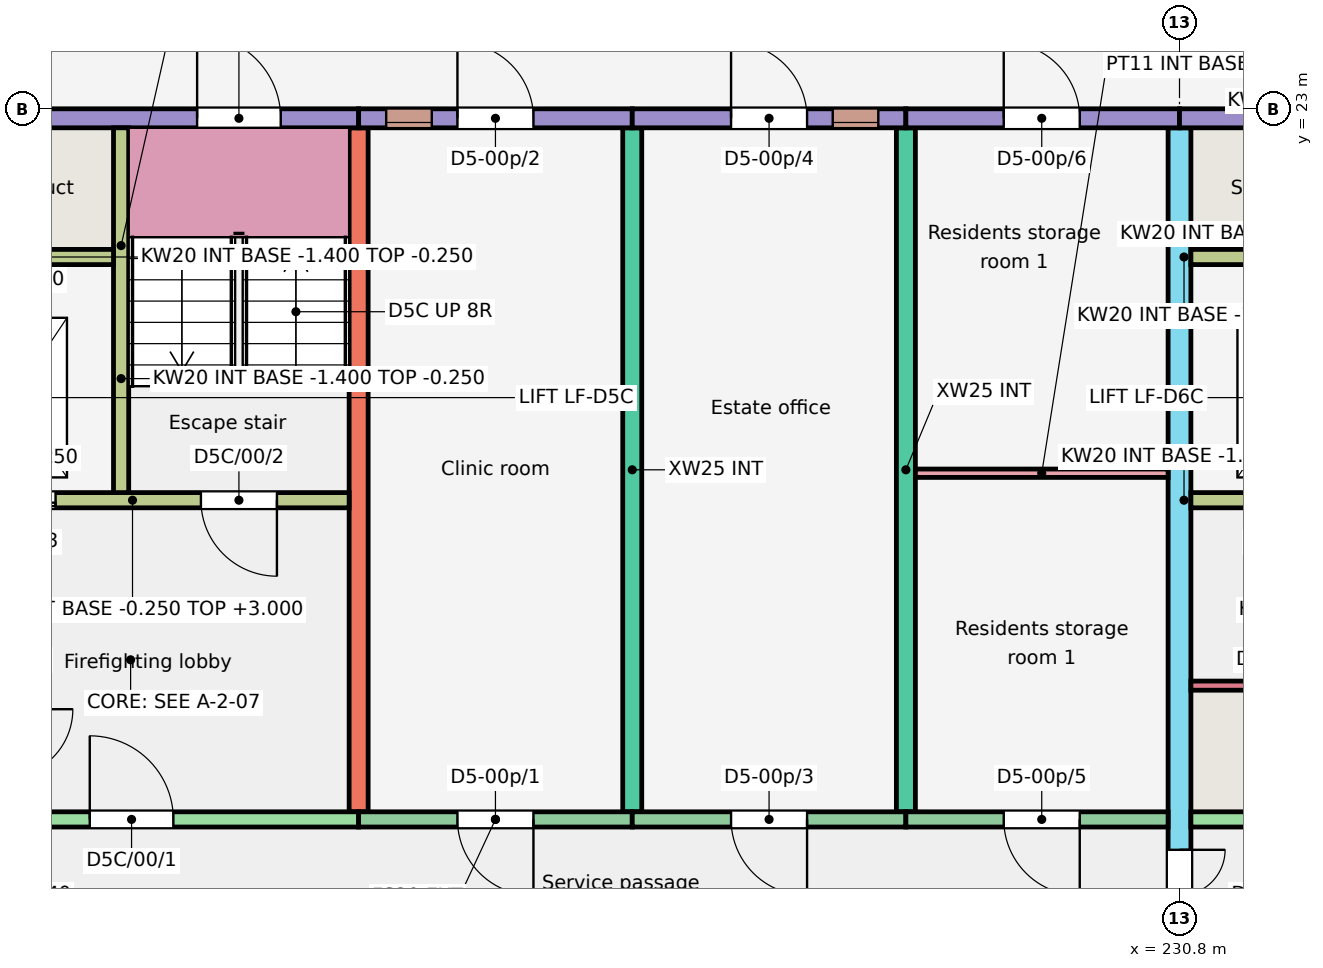
"""IFC4 building model, lengths in metres.
Left out: names, types, materials, properties, quantities, classifications, styles, units other than length and angle.
Written with IfcOpenShell. Run it as: python <this file> out.ifc"""

import sys

from ifc_helpers import new_model, si_unit, direction, frame, frame_2d, origin, place, context, subcontext, project, spatial, rectangle, extrude, element, fill, save


model = new_model("IFC4")
c1 = context("Model", 3, precision=1e-05, world=origin(), true_north=direction((0.0, 1.0)))
c2 = subcontext(c1, "Body", "Model", "MODEL_VIEW")
j1 = project(units=[si_unit("LENGTHUNIT", "METRE"), si_unit("PLANEANGLEUNIT", "RADIAN")], contexts=[c1])
p1 = place(None, origin())
s1 = spatial("IfcSite", under=j1, at=p1, CompositionType="ELEMENT")
p2 = place(p1, origin())
s2 = spatial("IfcBuilding", under=s1, at=p2, CompositionType="ELEMENT")
p3 = place(p2, origin())
s3 = spatial("IfcBuildingStorey", under=s2, at=p3, CompositionType="ELEMENT", Elevation=0.0)
for number, where, z_axis, x_axis in (
    (1, (220.0, 13.75, -0.25), (0.0, 0.0, 1.0), (0.0, 1.0, 0.0)),
    (2, (223.6, 13.75, -0.25), (0.0, 0.0, 1.0), (0.0, 1.0, 0.0)),
    (3, (227.2, 13.75, -0.25), (0.0, 0.0, 1.0), (0.0, 1.0, 0.0)),
):
    element("IfcWall", number, at=place(p3, frame(where, z_axis=z_axis, x_axis=x_axis)), inside=s3, PredefinedType="SHEAR", context=c2, shape_type="SweptSolid", body=[
        extrude(rectangle(XDim=9.0, YDim=0.25, at=frame_2d((4.5, 0.0))), origin(), (0.0, 0.0, 1.0), 3.25),
    ])
p4 = place(p3, frame((230.8, 11.75, -0.25), z_axis=(0.0, 0.0, 1.0), x_axis=(0.0, 1.0, 0.0)))
e4 = element("IfcWall", 4, at=p4, inside=s3, PredefinedType="SHEAR", context=c2, shape_type="SweptSolid", body=[
    extrude(rectangle(XDim=11.0, YDim=0.3, at=frame_2d((5.5, 0.0))), origin(), (0.0, 0.0, 1.0), 3.25),
])
p5 = place(p4, frame((0.3, 0.0, 0.25)))
e5 = element("IfcOpeningElement", 5, at=p5, cuts=e4, PredefinedType="OPENING", context=c2, shape_type="SweptSolid", body=[
    extrude(rectangle(XDim=1.2, YDim=2.1, at=frame_2d((0.6, 1.05))), frame((0.0, 0.16, 0.0), z_axis=(0.0, -1.0, 0.0), x_axis=(1.0, 0.0, 0.0)), (0.0, 0.0, 1.0), 0.32),
])
p6 = place(p3, frame((214.0, 22.875, -0.25), z_axis=(0.0, 0.0, 1.0), x_axis=(1.0, 0.0, 0.0)))
e6 = element("IfcWall", 6, at=p6, inside=s3, PredefinedType="SOLIDWALL", context=c2, shape_type="SweptSolid", body=[
    extrude(rectangle(XDim=6.0, YDim=0.25, at=frame_2d((3.0, 0.0))), origin(), (0.0, 0.0, 1.0), 3.25),
])
p7 = place(p6, frame((3.875, 0.0, 0.25)))
e7 = element("IfcOpeningElement", 7, at=p7, cuts=e6, PredefinedType="OPENING", context=c2, shape_type="SweptSolid", body=[
    extrude(rectangle(XDim=1.1, YDim=2.1, at=frame_2d((0.55, 1.05))), frame((0.0, 0.135, 0.0), z_axis=(0.0, -1.0, 0.0), x_axis=(1.0, 0.0, 0.0)), (0.0, 0.0, 1.0), 0.27),
])
p8 = place(p3, frame((214.15, 13.65, -0.25), z_axis=(0.0, 0.0, 1.0), x_axis=(1.0, 0.0, 0.0)))
e8 = element("IfcWall", 8, at=p8, inside=s3, PredefinedType="SHEAR", context=c2, shape_type="SweptSolid", body=[
    extrude(rectangle(XDim=5.85, YDim=0.2, at=frame_2d((2.925, 0.0))), origin(), (0.0, 0.0, 1.0), 3.25),
])
p9 = place(p8, frame((2.312, 0.0, 0.25)))
e9 = element("IfcOpeningElement", 9, at=p9, cuts=e8, PredefinedType="OPENING", context=c2, shape_type="SweptSolid", body=[
    extrude(rectangle(XDim=1.1, YDim=2.1, at=frame_2d((0.55, 1.05))), frame((0.0, 0.11, 0.0), z_axis=(0.0, -1.0, 0.0), x_axis=(1.0, 0.0, 0.0)), (0.0, 0.0, 1.0), 0.22),
])
p10 = place(p3, frame((214.15, 17.85, -0.25), z_axis=(0.0, 0.0, 1.0), x_axis=(1.0, 0.0, 0.0)))
e10 = element("IfcWall", 10, at=p10, inside=s3, PredefinedType="SHEAR", context=c2, shape_type="SweptSolid", body=[
    extrude(rectangle(XDim=5.725, YDim=0.2, at=frame_2d((2.863, 0.0))), origin(), (0.0, 0.0, 1.0), 3.25),
])
p11 = place(p10, frame((3.775, 0.0, 0.25)))
e11 = element("IfcOpeningElement", 11, at=p11, cuts=e10, PredefinedType="OPENING", context=c2, shape_type="SweptSolid", body=[
    extrude(rectangle(XDim=1.0, YDim=2.1, at=frame_2d((0.5, 1.05))), frame((0.0, 0.11, 0.0), z_axis=(0.0, -1.0, 0.0), x_axis=(1.0, 0.0, 0.0)), (0.0, 0.0, 1.0), 0.22),
])
p12 = place(p10, frame((0.762, 0.0, 0.25)))
e12 = element("IfcOpeningElement", 12, at=p12, cuts=e10, PredefinedType="OPENING", context=c2, shape_type="SweptSolid", body=[
    extrude(rectangle(XDim=1.1, YDim=2.1, at=frame_2d((0.55, 1.05))), frame((0.0, 0.11, 0.0), z_axis=(0.0, -1.0, 0.0), x_axis=(1.0, 0.0, 0.0)), (0.0, 0.0, 1.0), 0.22),
])
p13 = place(p3, frame((216.875, 17.95, -0.25), z_axis=(0.0, 0.0, 1.0), x_axis=(0.0, 1.0, 0.0)))
e13 = element("IfcWall", 13, at=p13, inside=s3, PredefinedType="SHEAR", context=c2, shape_type="SweptSolid", body=[
    extrude(rectangle(XDim=4.8, YDim=0.2, at=frame_2d((2.4, 0.0))), origin(), (0.0, 0.0, 1.0), 3.25),
])
p14 = place(p3, frame((214.15, 21.05, -0.25), z_axis=(0.0, 0.0, 1.0), x_axis=(1.0, 0.0, 0.0)))
e14 = element("IfcWall", 14, at=p14, inside=s3, PredefinedType="SHEAR", context=c2, shape_type="SweptSolid", body=[
    extrude(rectangle(XDim=2.625, YDim=0.2, at=frame_2d((1.312, 0.0))), origin(), (0.0, 0.0, 1.0), 3.25),
])
p15 = place(p3, frame((220.0, 22.875, -0.25), z_axis=(0.0, 0.0, 1.0), x_axis=(1.0, 0.0, 0.0)))
e15 = element("IfcWall", 15, at=p15, inside=s3, PredefinedType="SOLIDWALL", context=c2, shape_type="SweptSolid", body=[
    extrude(rectangle(XDim=3.6, YDim=0.25, at=frame_2d((1.8, 0.0))), origin(), (0.0, 0.0, 1.0), 3.25),
])
p16 = place(p15, frame((0.363, 0.0, 2.05)))
e16 = element("IfcOpeningElement", 16, at=p16, cuts=e15, PredefinedType="OPENING", context=c2, shape_type="SweptSolid", body=[
    extrude(rectangle(XDim=0.6, YDim=0.6, at=frame_2d((0.3, 0.3))), frame((0.0, 0.135, 0.0), z_axis=(0.0, -1.0, 0.0), x_axis=(1.0, 0.0, 0.0)), (0.0, 0.0, 1.0), 0.27),
])
p17 = place(p15, frame((1.3, 0.0, 0.25)))
e17 = element("IfcOpeningElement", 17, at=p17, cuts=e15, PredefinedType="OPENING", context=c2, shape_type="SweptSolid", body=[
    extrude(rectangle(XDim=1.0, YDim=2.1, at=frame_2d((0.5, 1.05))), frame((0.0, 0.135, 0.0), z_axis=(0.0, -1.0, 0.0), x_axis=(1.0, 0.0, 0.0)), (0.0, 0.0, 1.0), 0.27),
])
p18 = place(p3, frame((220.0, 13.65, -0.25), z_axis=(0.0, 0.0, 1.0), x_axis=(1.0, 0.0, 0.0)))
e18 = element("IfcWall", 18, at=p18, inside=s3, PredefinedType="SOLIDWALL", context=c2, shape_type="SweptSolid", body=[
    extrude(rectangle(XDim=3.6, YDim=0.2, at=frame_2d((1.8, 0.0))), origin(), (0.0, 0.0, 1.0), 3.25),
])
p19 = place(p18, frame((1.3, 0.0, 0.25)))
e19 = element("IfcOpeningElement", 19, at=p19, cuts=e18, PredefinedType="OPENING", context=c2, shape_type="SweptSolid", body=[
    extrude(rectangle(XDim=1.0, YDim=2.1, at=frame_2d((0.5, 1.05))), frame((0.0, 0.11, 0.0), z_axis=(0.0, -1.0, 0.0), x_axis=(1.0, 0.0, 0.0)), (0.0, 0.0, 1.0), 0.22),
])
p20 = place(p3, frame((223.6, 22.875, -0.25), z_axis=(0.0, 0.0, 1.0), x_axis=(1.0, 0.0, 0.0)))
e20 = element("IfcWall", 20, at=p20, inside=s3, PredefinedType="SOLIDWALL", context=c2, shape_type="SweptSolid", body=[
    extrude(rectangle(XDim=3.6, YDim=0.25, at=frame_2d((1.8, 0.0))), origin(), (0.0, 0.0, 1.0), 3.25),
])
p21 = place(p20, frame((2.637, 0.0, 2.05)))
e21 = element("IfcOpeningElement", 21, at=p21, cuts=e20, PredefinedType="OPENING", context=c2, shape_type="SweptSolid", body=[
    extrude(rectangle(XDim=0.6, YDim=0.6, at=frame_2d((0.3, 0.3))), frame((0.0, 0.135, 0.0), z_axis=(0.0, -1.0, 0.0), x_axis=(1.0, 0.0, 0.0)), (0.0, 0.0, 1.0), 0.27),
])
p22 = place(p20, frame((1.3, 0.0, 0.25)))
e22 = element("IfcOpeningElement", 22, at=p22, cuts=e20, PredefinedType="OPENING", context=c2, shape_type="SweptSolid", body=[
    extrude(rectangle(XDim=1.0, YDim=2.1, at=frame_2d((0.5, 1.05))), frame((0.0, 0.135, 0.0), z_axis=(0.0, -1.0, 0.0), x_axis=(1.0, 0.0, 0.0)), (0.0, 0.0, 1.0), 0.27),
])
p23 = place(p3, frame((223.6, 13.65, -0.25), z_axis=(0.0, 0.0, 1.0), x_axis=(1.0, 0.0, 0.0)))
e23 = element("IfcWall", 23, at=p23, inside=s3, PredefinedType="SOLIDWALL", context=c2, shape_type="SweptSolid", body=[
    extrude(rectangle(XDim=3.6, YDim=0.2, at=frame_2d((1.8, 0.0))), origin(), (0.0, 0.0, 1.0), 3.25),
])
p24 = place(p23, frame((1.3, 0.0, 0.25)))
e24 = element("IfcOpeningElement", 24, at=p24, cuts=e23, PredefinedType="OPENING", context=c2, shape_type="SweptSolid", body=[
    extrude(rectangle(XDim=1.0, YDim=2.1, at=frame_2d((0.5, 1.05))), frame((0.0, 0.11, 0.0), z_axis=(0.0, -1.0, 0.0), x_axis=(1.0, 0.0, 0.0)), (0.0, 0.0, 1.0), 0.22),
])
p25 = place(p3, frame((227.2, 22.875, -0.25), z_axis=(0.0, 0.0, 1.0), x_axis=(1.0, 0.0, 0.0)))
e25 = element("IfcWall", 25, at=p25, inside=s3, PredefinedType="SOLIDWALL", context=c2, shape_type="SweptSolid", body=[
    extrude(rectangle(XDim=3.6, YDim=0.25, at=frame_2d((1.8, 0.0))), origin(), (0.0, 0.0, 1.0), 3.25),
])
p26 = place(p25, frame((1.288, 0.0, 0.25)))
e26 = element("IfcOpeningElement", 26, at=p26, cuts=e25, PredefinedType="OPENING", context=c2, shape_type="SweptSolid", body=[
    extrude(rectangle(XDim=1.0, YDim=2.1, at=frame_2d((0.5, 1.05))), frame((0.0, 0.135, 0.0), z_axis=(0.0, -1.0, 0.0), x_axis=(1.0, 0.0, 0.0)), (0.0, 0.0, 1.0), 0.27),
])
p27 = place(p3, frame((227.2, 13.65, -0.25), z_axis=(0.0, 0.0, 1.0), x_axis=(1.0, 0.0, 0.0)))
e27 = element("IfcWall", 27, at=p27, inside=s3, PredefinedType="SOLIDWALL", context=c2, shape_type="SweptSolid", body=[
    extrude(rectangle(XDim=3.45, YDim=0.2, at=frame_2d((1.725, 0.0))), origin(), (0.0, 0.0, 1.0), 3.25),
])
p28 = place(p27, frame((1.288, 0.0, 0.25)))
e28 = element("IfcOpeningElement", 28, at=p28, cuts=e27, PredefinedType="OPENING", context=c2, shape_type="SweptSolid", body=[
    extrude(rectangle(XDim=1.0, YDim=2.1, at=frame_2d((0.5, 1.05))), frame((0.0, 0.11, 0.0), z_axis=(0.0, -1.0, 0.0), x_axis=(1.0, 0.0, 0.0)), (0.0, 0.0, 1.0), 0.22),
])
p29 = place(p3, frame((230.8, 22.875, -0.25), z_axis=(0.0, 0.0, 1.0), x_axis=(1.0, 0.0, 0.0)))
e29 = element("IfcWall", 29, at=p29, inside=s3, PredefinedType="SOLIDWALL", context=c2, shape_type="SweptSolid", body=[
    extrude(rectangle(XDim=6.0, YDim=0.25, at=frame_2d((3.0, 0.0))), origin(), (0.0, 0.0, 1.0), 3.25),
])
p30 = place(p29, frame((3.875, 0.0, 0.25)))
e30 = element("IfcOpeningElement", 30, at=p30, cuts=e29, PredefinedType="OPENING", context=c2, shape_type="SweptSolid", body=[
    extrude(rectangle(XDim=1.1, YDim=2.1, at=frame_2d((0.55, 1.05))), frame((0.0, 0.135, 0.0), z_axis=(0.0, -1.0, 0.0), x_axis=(1.0, 0.0, 0.0)), (0.0, 0.0, 1.0), 0.27),
])
p31 = place(p3, frame((230.95, 13.65, -0.25), z_axis=(0.0, 0.0, 1.0), x_axis=(1.0, 0.0, 0.0)))
e31 = element("IfcWall", 31, at=p31, inside=s3, PredefinedType="SHEAR", context=c2, shape_type="SweptSolid", body=[
    extrude(rectangle(XDim=5.85, YDim=0.2, at=frame_2d((2.925, 0.0))), origin(), (0.0, 0.0, 1.0), 3.25),
])
p32 = place(p31, frame((2.312, 0.0, 0.25)))
e32 = element("IfcOpeningElement", 32, at=p32, cuts=e31, PredefinedType="OPENING", context=c2, shape_type="SweptSolid", body=[
    extrude(rectangle(XDim=1.1, YDim=2.1, at=frame_2d((0.55, 1.05))), frame((0.0, 0.11, 0.0), z_axis=(0.0, -1.0, 0.0), x_axis=(1.0, 0.0, 0.0)), (0.0, 0.0, 1.0), 0.22),
])
p33 = place(p3, frame((230.95, 17.85, -0.25), z_axis=(0.0, 0.0, 1.0), x_axis=(1.0, 0.0, 0.0)))
e33 = element("IfcWall", 33, at=p33, inside=s3, PredefinedType="SHEAR", context=c2, shape_type="SweptSolid", body=[
    extrude(rectangle(XDim=5.725, YDim=0.2, at=frame_2d((2.863, 0.0))), origin(), (0.0, 0.0, 1.0), 3.25),
])
p34 = place(p33, frame((3.775, 0.0, 0.25)))
e34 = element("IfcOpeningElement", 34, at=p34, cuts=e33, PredefinedType="OPENING", context=c2, shape_type="SweptSolid", body=[
    extrude(rectangle(XDim=1.0, YDim=2.1, at=frame_2d((0.5, 1.05))), frame((0.0, 0.11, 0.0), z_axis=(0.0, -1.0, 0.0), x_axis=(1.0, 0.0, 0.0)), (0.0, 0.0, 1.0), 0.22),
])
p35 = place(p33, frame((0.762, 0.0, 0.25)))
e35 = element("IfcOpeningElement", 35, at=p35, cuts=e33, PredefinedType="OPENING", context=c2, shape_type="SweptSolid", body=[
    extrude(rectangle(XDim=1.1, YDim=2.1, at=frame_2d((0.55, 1.05))), frame((0.0, 0.11, 0.0), z_axis=(0.0, -1.0, 0.0), x_axis=(1.0, 0.0, 0.0)), (0.0, 0.0, 1.0), 0.22),
])
p36 = place(p3, frame((230.95, 21.05, -0.25), z_axis=(0.0, 0.0, 1.0), x_axis=(1.0, 0.0, 0.0)))
e36 = element("IfcWall", 36, at=p36, inside=s3, PredefinedType="SHEAR", context=c2, shape_type="SweptSolid", body=[
    extrude(rectangle(XDim=2.625, YDim=0.2, at=frame_2d((1.312, 0.0))), origin(), (0.0, 0.0, 1.0), 3.25),
])
p37 = place(p3, frame((230.95, 15.41, -0.25), z_axis=(0.0, 0.0, 1.0), x_axis=(1.0, 0.0, 0.0)))
e37 = element("IfcWall", 37, at=p37, inside=s3, PredefinedType="SHEAR", context=c2, shape_type="SweptSolid", body=[
    extrude(rectangle(XDim=1.13, YDim=0.12, at=frame_2d((0.565, 0.0))), origin(), (0.0, 0.0, 1.0), 3.25),
])
for number, where, z_axis, x_axis in (
    (38, (214.0, 17.85, -1.4), (0.0, 0.0, 1.0), (1.0, 0.0, 0.0)),
    (39, (214.0, 21.05, -1.4), (0.0, 0.0, 1.0), (1.0, 0.0, 0.0)),
):
    element("IfcWall", number, at=place(p3, frame(where, z_axis=z_axis, x_axis=x_axis)), inside=s3, PredefinedType="SHEAR", context=c2, shape_type="SweptSolid", body=[
        extrude(rectangle(XDim=2.975, YDim=0.2, at=frame_2d((1.488, 0.0))), origin(), (0.0, 0.0, 1.0), 1.15),
    ])
p38 = place(p3, frame((216.875, 17.95, -1.4), z_axis=(0.0, 0.0, 1.0), x_axis=(0.0, 1.0, 0.0)))
e40 = element("IfcWall", 40, at=p38, inside=s3, PredefinedType="SHEAR", context=c2, shape_type="SweptSolid", body=[
    extrude(rectangle(XDim=3.0, YDim=0.2, at=frame_2d((1.5, 0.0))), origin(), (0.0, 0.0, 1.0), 1.15),
])
for number, where, z_axis, x_axis in (
    (41, (230.8, 17.85, -1.4), (0.0, 0.0, 1.0), (1.0, 0.0, 0.0)),
    (42, (230.8, 21.05, -1.4), (0.0, 0.0, 1.0), (1.0, 0.0, 0.0)),
):
    element("IfcWall", number, at=place(p3, frame(where, z_axis=z_axis, x_axis=x_axis)), inside=s3, PredefinedType="SHEAR", context=c2, shape_type="SweptSolid", body=[
        extrude(rectangle(XDim=2.975, YDim=0.2, at=frame_2d((1.487, 0.0))), origin(), (0.0, 0.0, 1.0), 1.15),
    ])
p39 = place(p3, frame((230.875, 17.95, -1.4), z_axis=(0.0, 0.0, 1.0), x_axis=(0.0, 1.0, 0.0)))
e43 = element("IfcWall", 43, at=p39, inside=s3, PredefinedType="SHEAR", context=c2, shape_type="SweptSolid", body=[
    extrude(rectangle(XDim=3.0, YDim=0.15, at=frame_2d((1.5, 0.0))), origin(), (0.0, 0.0, 1.0), 1.15),
])
p40 = place(p3, frame((227.325, 18.205, 0.0), z_axis=(0.0, 0.0, 1.0), x_axis=(1.0, 0.0, 0.0)))
e44 = element("IfcWall", 44, at=p40, inside=s3, PredefinedType="PARTITIONING", context=c2, shape_type="SweptSolid", body=[
    extrude(rectangle(XDim=3.325, YDim=0.11, at=frame_2d((1.663, 0.0))), origin(), (0.0, 0.0, 1.0), 2.8),
])
p41 = place(p16, origin())
e45 = element("IfcWindow", 45, at=p41, inside=s3, PartitioningType="SINGLE_PANEL", PredefinedType="WINDOW", context=c2, shape_type="SweptSolid", body=[
    extrude(rectangle(XDim=0.6, YDim=0.6, at=frame_2d((0.3, 0.3))), frame((0.0, -0.025, 0.0), z_axis=(0.0, -1.0, 0.0), x_axis=(1.0, 0.0, 0.0)), (0.0, 0.0, 1.0), 0.06),
])
fill(e16, e45)
p42 = place(p21, origin())
e46 = element("IfcWindow", 46, at=p42, inside=s3, PartitioningType="SINGLE_PANEL", PredefinedType="WINDOW", context=c2, shape_type="SweptSolid", body=[
    extrude(rectangle(XDim=0.6, YDim=0.6, at=frame_2d((0.3, 0.3))), frame((0.0, -0.025, 0.0), z_axis=(0.0, -1.0, 0.0), x_axis=(1.0, 0.0, 0.0)), (0.0, 0.0, 1.0), 0.06),
])
fill(e21, e46)
p43 = place(p19, origin())
e47 = element("IfcDoor", 47, at=p43, inside=s3, OperationType="SINGLE_SWING_RIGHT", PredefinedType="DOOR", context=c2, shape_type="SweptSolid", body=[
    extrude(rectangle(XDim=1.0, YDim=2.1, at=frame_2d((0.5, 1.05))), frame((0.0, 0.025, 0.0), z_axis=(0.0, -1.0, 0.0), x_axis=(1.0, 0.0, 0.0)), (0.0, 0.0, 1.0), 0.05),
])
fill(e19, e47)
p44 = place(p17, origin())
e48 = element("IfcDoor", 48, at=p44, inside=s3, OperationType="SINGLE_SWING_LEFT", PredefinedType="DOOR", context=c2, shape_type="SweptSolid", body=[
    extrude(rectangle(XDim=1.0, YDim=2.1, at=frame_2d((0.5, 1.05))), frame((0.0, 0.025, 0.0), z_axis=(0.0, -1.0, 0.0), x_axis=(1.0, 0.0, 0.0)), (0.0, 0.0, 1.0), 0.05),
])
fill(e17, e48)
p45 = place(p24, origin())
e49 = element("IfcDoor", 49, at=p45, inside=s3, OperationType="SINGLE_SWING_RIGHT", PredefinedType="DOOR", context=c2, shape_type="SweptSolid", body=[
    extrude(rectangle(XDim=1.0, YDim=2.1, at=frame_2d((0.5, 1.05))), frame((0.0, 0.025, 0.0), z_axis=(0.0, -1.0, 0.0), x_axis=(1.0, 0.0, 0.0)), (0.0, 0.0, 1.0), 0.05),
])
fill(e24, e49)
p46 = place(p22, origin())
e50 = element("IfcDoor", 50, at=p46, inside=s3, OperationType="SINGLE_SWING_LEFT", PredefinedType="DOOR", context=c2, shape_type="SweptSolid", body=[
    extrude(rectangle(XDim=1.0, YDim=2.1, at=frame_2d((0.5, 1.05))), frame((0.0, 0.025, 0.0), z_axis=(0.0, -1.0, 0.0), x_axis=(1.0, 0.0, 0.0)), (0.0, 0.0, 1.0), 0.05),
])
fill(e22, e50)
p47 = place(p28, origin())
e51 = element("IfcDoor", 51, at=p47, inside=s3, OperationType="SINGLE_SWING_RIGHT", PredefinedType="DOOR", context=c2, shape_type="SweptSolid", body=[
    extrude(rectangle(XDim=1.0, YDim=2.1, at=frame_2d((0.5, 1.05))), frame((0.0, 0.025, 0.0), z_axis=(0.0, -1.0, 0.0), x_axis=(1.0, 0.0, 0.0)), (0.0, 0.0, 1.0), 0.05),
])
fill(e28, e51)
p48 = place(p26, origin())
e52 = element("IfcDoor", 52, at=p48, inside=s3, OperationType="SINGLE_SWING_LEFT", PredefinedType="DOOR", context=c2, shape_type="SweptSolid", body=[
    extrude(rectangle(XDim=1.0, YDim=2.1, at=frame_2d((0.5, 1.05))), frame((0.0, 0.025, 0.0), z_axis=(0.0, -1.0, 0.0), x_axis=(1.0, 0.0, 0.0)), (0.0, 0.0, 1.0), 0.05),
])
fill(e26, e52)
p49 = place(p9, origin())
e53 = element("IfcDoor", 53, at=p49, inside=s3, OperationType="SINGLE_SWING_LEFT", PredefinedType="DOOR", context=c2, shape_type="SweptSolid", body=[
    extrude(rectangle(XDim=1.1, YDim=2.1, at=frame_2d((0.55, 1.05))), frame((0.0, 0.025, 0.0), z_axis=(0.0, -1.0, 0.0), x_axis=(1.0, 0.0, 0.0)), (0.0, 0.0, 1.0), 0.05),
])
fill(e9, e53)
p50 = place(p11, origin())
e54 = element("IfcDoor", 54, at=p50, inside=s3, OperationType="SINGLE_SWING_RIGHT", PredefinedType="DOOR", context=c2, shape_type="SweptSolid", body=[
    extrude(rectangle(XDim=1.0, YDim=2.1, at=frame_2d((0.5, 1.05))), frame((0.0, 0.025, 0.0), z_axis=(0.0, -1.0, 0.0), x_axis=(1.0, 0.0, 0.0)), (0.0, 0.0, 1.0), 0.05),
])
fill(e11, e54)
p51 = place(p12, origin())
e55 = element("IfcDoor", 55, at=p51, inside=s3, OperationType="DOUBLE_DOOR_SLIDING", PredefinedType="DOOR", context=c2, shape_type="SweptSolid", body=[
    extrude(rectangle(XDim=1.1, YDim=2.1, at=frame_2d((0.55, 1.05))), frame((0.0, 0.025, 0.0), z_axis=(0.0, -1.0, 0.0), x_axis=(1.0, 0.0, 0.0)), (0.0, 0.0, 1.0), 0.05),
])
fill(e12, e55)
p52 = place(p7, origin())
e56 = element("IfcDoor", 56, at=p52, inside=s3, OperationType="SINGLE_SWING_LEFT", PredefinedType="DOOR", context=c2, shape_type="SweptSolid", body=[
    extrude(rectangle(XDim=1.1, YDim=2.1, at=frame_2d((0.55, 1.05))), frame((0.0, 0.025, 0.0), z_axis=(0.0, -1.0, 0.0), x_axis=(1.0, 0.0, 0.0)), (0.0, 0.0, 1.0), 0.05),
])
fill(e7, e56)
p53 = place(p5, origin())
e57 = element("IfcDoor", 57, at=p53, inside=s3, OperationType="DOUBLE_DOOR_SINGLE_SWING", PredefinedType="DOOR", context=c2, shape_type="SweptSolid", body=[
    extrude(rectangle(XDim=1.2, YDim=2.1, at=frame_2d((0.6, 1.05))), frame((0.0, 0.025, 0.0), z_axis=(0.0, -1.0, 0.0), x_axis=(1.0, 0.0, 0.0)), (0.0, 0.0, 1.0), 0.05),
])
fill(e5, e57)
save(model, sys.argv[1])
